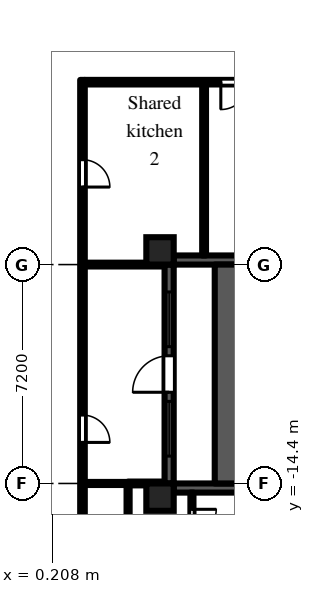
"""IFC4 building model, lengths in metres.
Left out: names, types, materials, properties, quantities, classifications, styles, units other than length and angle.
Written with IfcOpenShell. Run it as: python <this file> out.ifc"""

import sys

from ifc_helpers import new_model, si_unit, direction, frame, frame_2d, origin, origin_2d, place, context, subcontext, project, spatial, rectangle, extrude, element, fill, save


model = new_model("IFC4")
c1 = context("Model", 3, precision=1e-05, world=origin(), true_north=direction((0.0, 1.0)))
c2 = subcontext(c1, "Body", "Model", "MODEL_VIEW")
j1 = project(units=[si_unit("LENGTHUNIT", "METRE"), si_unit("PLANEANGLEUNIT", "RADIAN")], contexts=[c1])
p1 = place(None, origin())
s1 = spatial("IfcSite", under=j1, at=p1, CompositionType="ELEMENT")
p2 = place(p1, origin())
s2 = spatial("IfcBuilding", under=s1, at=p2, CompositionType="ELEMENT")
p3 = place(p2, frame((0.0, 0.0, 20.7)))
s3 = spatial("IfcBuildingStorey", under=s2, at=p3, CompositionType="ELEMENT", Elevation=20.7)
for number, where, z_axis, x_axis in (
    (1, (3.75, -14.85, 0.0), (0.0, 0.0, 1.0), (1.0, 0.0, 0.0)),
    (2, (3.75, -6.75, 0.0), (0.0, 0.0, 1.0), (1.0, 0.0, 0.0)),
):
    element("IfcColumn", number, at=place(p3, frame(where, z_axis=z_axis, x_axis=x_axis)), inside=s3, PredefinedType="COLUMN", context=c2, shape_type="SweptSolid", body=[
        extrude(rectangle(XDim=0.9, YDim=0.9, at=origin_2d()), origin(), (0.0, 0.0, 1.0), 3.0),
    ])
p4 = place(p3, frame((6.3, -14.55, 0.0), z_axis=(0.0, 0.0, 1.0), x_axis=(-1.0, 0.0, 0.0)))
e3 = element("IfcWall", 3, at=p4, inside=s3, PredefinedType="SOLIDWALL", context=c2, shape_type="SweptSolid", body=[
    extrude(rectangle(XDim=2.1, YDim=0.3, at=frame_2d((1.05, 0.0))), origin(), (0.0, 0.0, 1.0), 2.1),
])
p5 = place(p3, frame((4.05, -14.4, 0.0), z_axis=(0.0, 0.0, 1.0), x_axis=(0.0, 1.0, 0.0)))
e4 = element("IfcWall", 4, at=p5, inside=s3, PredefinedType="SOLIDWALL", context=c2, shape_type="SweptSolid", body=[
    extrude(rectangle(XDim=7.2, YDim=0.3, at=frame_2d((3.6, 0.0))), origin(), (0.0, 0.0, 1.0), 2.1),
])
p6 = place(p5, frame((3.0, 0.0, 0.0)))
e5 = element("IfcOpeningElement", 5, at=p6, cuts=e4, PredefinedType="OPENING", context=c2, shape_type="SweptSolid", body=[
    extrude(rectangle(XDim=1.2, YDim=2.05, at=frame_2d((0.6, 1.025))), frame((0.0, 0.16, 0.0), z_axis=(0.0, -1.0, 0.0), x_axis=(1.0, 0.0, 0.0)), (0.0, 0.0, 1.0), 0.32),
])
p7 = place(p5, frame((0.9, 0.0, 0.2)))
e6 = element("IfcOpeningElement", 6, at=p7, cuts=e4, PredefinedType="OPENING", context=c2, shape_type="SweptSolid", body=[
    extrude(rectangle(XDim=1.8, YDim=1.85, at=frame_2d((0.9, 0.925))), frame((0.0, 0.16, 0.0), z_axis=(0.0, -1.0, 0.0), x_axis=(1.0, 0.0, 0.0)), (0.0, 0.0, 1.0), 0.32),
])
p8 = place(p5, frame((4.5, 0.0, 0.2)))
e7 = element("IfcOpeningElement", 7, at=p8, cuts=e4, PredefinedType="OPENING", context=c2, shape_type="SweptSolid", body=[
    extrude(rectangle(XDim=1.8, YDim=1.85, at=frame_2d((0.9, 0.925))), frame((0.0, 0.16, 0.0), z_axis=(0.0, -1.0, 0.0), x_axis=(1.0, 0.0, 0.0)), (0.0, 0.0, 1.0), 0.32),
])
p9 = place(p3, frame((4.2, -7.05, 0.0), z_axis=(0.0, 0.0, 1.0), x_axis=(1.0, 0.0, 0.0)))
e8 = element("IfcWall", 8, at=p9, inside=s3, PredefinedType="SOLIDWALL", context=c2, shape_type="SweptSolid", body=[
    extrude(rectangle(XDim=3.0, YDim=0.3, at=frame_2d((1.5, 0.0))), origin(), (0.0, 0.0, 1.0), 2.1),
])
p10 = place(p3, frame((6.0, -14.4, 0.0), z_axis=(0.0, 0.0, 1.0), x_axis=(0.0, 1.0, 0.0)))
e9 = element("IfcWall", 9, at=p10, inside=s3, PredefinedType="PARAPET", context=c2, shape_type="SweptSolid", body=[
    extrude(rectangle(XDim=7.2, YDim=0.9, at=frame_2d((3.6, 0.0))), origin(), (0.0, 0.0, 1.0), 0.8),
])
p11 = place(p3, frame((1.2, -36.5, 0.0), z_axis=(0.0, 0.0, 1.0), x_axis=(0.0, 1.0, 0.0)))
e10 = element("IfcWall", 10, at=p11, inside=s3, PredefinedType="PARTITIONING", context=c2, shape_type="SweptSolid", body=[
    extrude(rectangle(XDim=35.375, YDim=0.15, at=frame_2d((17.688, 0.0))), origin(), (0.0, 0.0, 1.0), 2.575),
])
p12 = place(p11, frame((31.85, 0.0, 0.0)))
e11 = element("IfcOpeningElement", 11, at=p12, cuts=e10, PredefinedType="OPENING", context=c2, shape_type="SweptSolid", body=[
    extrude(rectangle(XDim=0.9, YDim=2.1, at=frame_2d((0.45, 1.05))), frame((0.0, 0.085, 0.0), z_axis=(0.0, -1.0, 0.0), x_axis=(1.0, 0.0, 0.0)), (0.0, 0.0, 1.0), 0.17),
])
p13 = place(p11, frame((23.45, 0.0, 0.0)))
e12 = element("IfcOpeningElement", 12, at=p13, cuts=e10, PredefinedType="OPENING", context=c2, shape_type="SweptSolid", body=[
    extrude(rectangle(XDim=0.9, YDim=2.1, at=frame_2d((0.45, 1.05))), frame((0.0, 0.085, 0.0), z_axis=(0.0, -1.0, 0.0), x_axis=(1.0, 0.0, 0.0)), (0.0, 0.0, 1.0), 0.17),
])
p14 = place(p11, frame((1.55, 0.0, 0.0)))
e13 = element("IfcOpeningElement", 13, at=p14, cuts=e10, PredefinedType="OPENING", context=c2, shape_type="SweptSolid", body=[
    extrude(rectangle(XDim=1.0, YDim=2.1, at=frame_2d((0.5, 1.05))), frame((0.0, 0.085, 0.0), z_axis=(0.0, -1.0, 0.0), x_axis=(1.0, 0.0, 0.0)), (0.0, 0.0, 1.0), 0.17),
])
p15 = place(p3, frame((1.275, -14.4, 0.0), z_axis=(0.0, 0.0, 1.0), x_axis=(1.0, 0.0, 0.0)))
e14 = element("IfcWall", 14, at=p15, inside=s3, PredefinedType="PARTITIONING", context=c2, shape_type="SweptSolid", body=[
    extrude(rectangle(XDim=1.425, YDim=0.1, at=frame_2d((0.712, 0.0))), origin(), (0.0, 0.0, 1.0), 2.575),
])
p16 = place(p3, frame((1.275, -7.2, 0.0), z_axis=(0.0, 0.0, 1.0), x_axis=(1.0, 0.0, 0.0)))
e15 = element("IfcWall", 15, at=p16, inside=s3, PredefinedType="PARTITIONING", context=c2, shape_type="SweptSolid", body=[
    extrude(rectangle(XDim=2.625, YDim=0.125, at=frame_2d((1.312, 0.0))), origin(), (0.0, 0.0, 1.0), 2.575),
])
p17 = place(p3, frame((1.275, -1.2, 0.0), z_axis=(0.0, 0.0, 1.0), x_axis=(1.0, 0.0, 0.0)))
e16 = element("IfcWall", 16, at=p17, inside=s3, PredefinedType="PARTITIONING", context=c2, shape_type="SweptSolid", body=[
    extrude(rectangle(XDim=5.925, YDim=0.15, at=frame_2d((2.962, 0.0))), origin(), (0.0, 0.0, 1.0), 2.575),
])
p18 = place(p17, frame((4.475, 0.0, 0.0)))
e17 = element("IfcOpeningElement", 17, at=p18, cuts=e16, PredefinedType="OPENING", context=c2, shape_type="SweptSolid", body=[
    extrude(rectangle(XDim=0.9, YDim=2.1, at=frame_2d((0.45, 1.05))), frame((0.0, 0.085, 0.0), z_axis=(0.0, -1.0, 0.0), x_axis=(1.0, 0.0, 0.0)), (0.0, 0.0, 1.0), 0.17),
])
p19 = place(p3, frame((2.7, -32.35, 0.0), z_axis=(0.0, 0.0, 1.0), x_axis=(0.0, 1.0, 0.0)))
e18 = element("IfcWall", 18, at=p19, inside=s3, PredefinedType="PARTITIONING", context=c2, shape_type="SweptSolid", body=[
    extrude(rectangle(XDim=17.888, YDim=0.1, at=frame_2d((8.944, 0.0))), origin(), (0.0, 0.0, 1.0), 2.575),
])
p20 = place(p19, frame((2.2, 0.0, 0.0)))
e19 = element("IfcOpeningElement", 19, at=p20, cuts=e18, PredefinedType="OPENING", context=c2, shape_type="SweptSolid", body=[
    extrude(rectangle(XDim=0.9, YDim=2.1, at=frame_2d((0.45, 1.05))), frame((0.0, 0.06, 0.0), z_axis=(0.0, -1.0, 0.0), x_axis=(1.0, 0.0, 0.0)), (0.0, 0.0, 1.0), 0.12),
])
p21 = place(p19, frame((4.0, 0.0, 0.0)))
e20 = element("IfcOpeningElement", 20, at=p21, cuts=e18, PredefinedType="OPENING", context=c2, shape_type="SweptSolid", body=[
    extrude(rectangle(XDim=0.9, YDim=2.1, at=frame_2d((0.45, 1.05))), frame((0.0, 0.06, 0.0), z_axis=(0.0, -1.0, 0.0), x_axis=(1.0, 0.0, 0.0)), (0.0, 0.0, 1.0), 0.12),
])
p22 = place(p19, frame((9.4, 0.0, 0.0)))
e21 = element("IfcOpeningElement", 21, at=p22, cuts=e18, PredefinedType="OPENING", context=c2, shape_type="SweptSolid", body=[
    extrude(rectangle(XDim=0.9, YDim=2.1, at=frame_2d((0.45, 1.05))), frame((0.0, 0.06, 0.0), z_axis=(0.0, -1.0, 0.0), x_axis=(1.0, 0.0, 0.0)), (0.0, 0.0, 1.0), 0.12),
])
p23 = place(p19, frame((11.2, 0.0, 0.0)))
e22 = element("IfcOpeningElement", 22, at=p23, cuts=e18, PredefinedType="OPENING", context=c2, shape_type="SweptSolid", body=[
    extrude(rectangle(XDim=0.9, YDim=2.1, at=frame_2d((0.45, 1.05))), frame((0.0, 0.06, 0.0), z_axis=(0.0, -1.0, 0.0), x_axis=(1.0, 0.0, 0.0)), (0.0, 0.0, 1.0), 0.12),
])
p24 = place(p19, frame((14.8, 0.0, 0.0)))
e23 = element("IfcOpeningElement", 23, at=p24, cuts=e18, PredefinedType="OPENING", context=c2, shape_type="SweptSolid", body=[
    extrude(rectangle(XDim=0.9, YDim=2.1, at=frame_2d((0.45, 1.05))), frame((0.0, 0.06, 0.0), z_axis=(0.0, -1.0, 0.0), x_axis=(1.0, 0.0, 0.0)), (0.0, 0.0, 1.0), 0.12),
])
p25 = place(p3, frame((2.7, -14.4, 0.0), z_axis=(0.0, 0.0, 1.0), x_axis=(1.0, 0.0, 0.0)))
e24 = element("IfcWall", 24, at=p25, inside=s3, PredefinedType="PARTITIONING", context=c2, shape_type="SweptSolid", body=[
    extrude(rectangle(XDim=1.2, YDim=0.125, at=frame_2d((0.6, 0.0))), origin(), (0.0, 0.0, 1.0), 2.575),
])
p26 = place(p3, frame((4.8, -16.15, 0.0), z_axis=(0.0, 0.0, 1.0), x_axis=(0.0, 1.0, 0.0)))
e25 = element("IfcWall", 25, at=p26, inside=s3, PredefinedType="PARTITIONING", context=c2, shape_type="SweptSolid", body=[
    extrude(rectangle(XDim=1.45, YDim=0.1, at=frame_2d((0.725, 0.0))), origin(), (0.0, 0.0, 1.0), 2.575),
])
p27 = place(p26, frame((0.1, 0.0, 0.0)))
e26 = element("IfcOpeningElement", 26, at=p27, cuts=e25, PredefinedType="OPENING", context=c2, shape_type="SweptSolid", body=[
    extrude(rectangle(XDim=0.8, YDim=2.1, at=frame_2d((0.4, 1.05))), frame((0.0, 0.06, 0.0), z_axis=(0.0, -1.0, 0.0), x_axis=(1.0, 0.0, 0.0)), (0.0, 0.0, 1.0), 0.12),
])
p28 = place(p3, frame((5.2, -6.9, 0.0), z_axis=(0.0, 0.0, 1.0), x_axis=(0.0, 1.0, 0.0)))
e27 = element("IfcWall", 27, at=p28, inside=s3, PredefinedType="PARTITIONING", context=c2, shape_type="SweptSolid", body=[
    extrude(rectangle(XDim=5.625, YDim=0.125, at=frame_2d((2.812, 0.0))), origin(), (0.0, 0.0, 1.0), 2.575),
])
p29 = place(p6, origin())
e28 = element("IfcDoor", 28, at=p29, inside=s3, OperationType="SINGLE_SWING_LEFT", PredefinedType="DOOR", context=c2, shape_type="SweptSolid", body=[
    extrude(rectangle(XDim=1.2, YDim=2.05, at=frame_2d((0.6, 1.025))), frame((0.0, 0.025, 0.0), z_axis=(0.0, -1.0, 0.0), x_axis=(1.0, 0.0, 0.0)), (0.0, 0.0, 1.0), 0.05),
])
fill(e5, e28)
p30 = place(p7, origin())
e29 = element("IfcWindow", 29, at=p30, inside=s3, PartitioningType="SINGLE_PANEL", PredefinedType="WINDOW", context=c2, shape_type="SweptSolid", body=[
    extrude(rectangle(XDim=1.8, YDim=1.85, at=frame_2d((0.9, 0.925))), frame((0.0, 0.03, 0.0), z_axis=(0.0, -1.0, 0.0), x_axis=(1.0, 0.0, 0.0)), (0.0, 0.0, 1.0), 0.06),
])
fill(e6, e29)
p31 = place(p8, origin())
e30 = element("IfcWindow", 30, at=p31, inside=s3, PartitioningType="SINGLE_PANEL", PredefinedType="WINDOW", context=c2, shape_type="SweptSolid", body=[
    extrude(rectangle(XDim=1.8, YDim=1.85, at=frame_2d((0.9, 0.925))), frame((0.0, 0.03, 0.0), z_axis=(0.0, -1.0, 0.0), x_axis=(1.0, 0.0, 0.0)), (0.0, 0.0, 1.0), 0.06),
])
fill(e7, e30)
p32 = place(p12, frame((0.9, 0.0, 0.0), z_axis=(0.0, 0.0, 1.0), x_axis=(-1.0, 0.0, 0.0)))
e31 = element("IfcDoor", 31, at=p32, inside=s3, OperationType="SINGLE_SWING_RIGHT", PredefinedType="DOOR", context=c2, shape_type="SweptSolid", body=[
    extrude(rectangle(XDim=0.9, YDim=2.1, at=frame_2d((0.45, 1.05))), frame((0.0, 0.025, 0.0), z_axis=(0.0, -1.0, 0.0), x_axis=(1.0, 0.0, 0.0)), (0.0, 0.0, 1.0), 0.05),
])
fill(e11, e31)
p33 = place(p18, frame((0.9, 0.0, 0.0), z_axis=(0.0, 0.0, 1.0), x_axis=(-1.0, 0.0, 0.0)))
e32 = element("IfcDoor", 32, at=p33, inside=s3, OperationType="SINGLE_SWING_RIGHT", PredefinedType="DOOR", context=c2, shape_type="SweptSolid", body=[
    extrude(rectangle(XDim=0.9, YDim=2.1, at=frame_2d((0.45, 1.05))), frame((0.0, 0.025, 0.0), z_axis=(0.0, -1.0, 0.0), x_axis=(1.0, 0.0, 0.0)), (0.0, 0.0, 1.0), 0.05),
])
fill(e17, e32)
p34 = place(p13, frame((0.9, 0.0, 0.0), z_axis=(0.0, 0.0, 1.0), x_axis=(-1.0, 0.0, 0.0)))
e33 = element("IfcDoor", 33, at=p34, inside=s3, OperationType="SINGLE_SWING_RIGHT", PredefinedType="DOOR", context=c2, shape_type="SweptSolid", body=[
    extrude(rectangle(XDim=0.9, YDim=2.1, at=frame_2d((0.45, 1.05))), frame((0.0, 0.025, 0.0), z_axis=(0.0, -1.0, 0.0), x_axis=(1.0, 0.0, 0.0)), (0.0, 0.0, 1.0), 0.05),
])
fill(e12, e33)
p35 = place(p27, frame((0.8, 0.0, 0.0), z_axis=(0.0, 0.0, 1.0), x_axis=(-1.0, 0.0, 0.0)))
e34 = element("IfcDoor", 34, at=p35, inside=s3, OperationType="SINGLE_SWING_LEFT", PredefinedType="DOOR", context=c2, shape_type="SweptSolid", body=[
    extrude(rectangle(XDim=0.8, YDim=2.1, at=frame_2d((0.4, 1.05))), frame((0.0, 0.025, 0.0), z_axis=(0.0, -1.0, 0.0), x_axis=(1.0, 0.0, 0.0)), (0.0, 0.0, 1.0), 0.05),
])
fill(e26, e34)
save(model, sys.argv[1])
